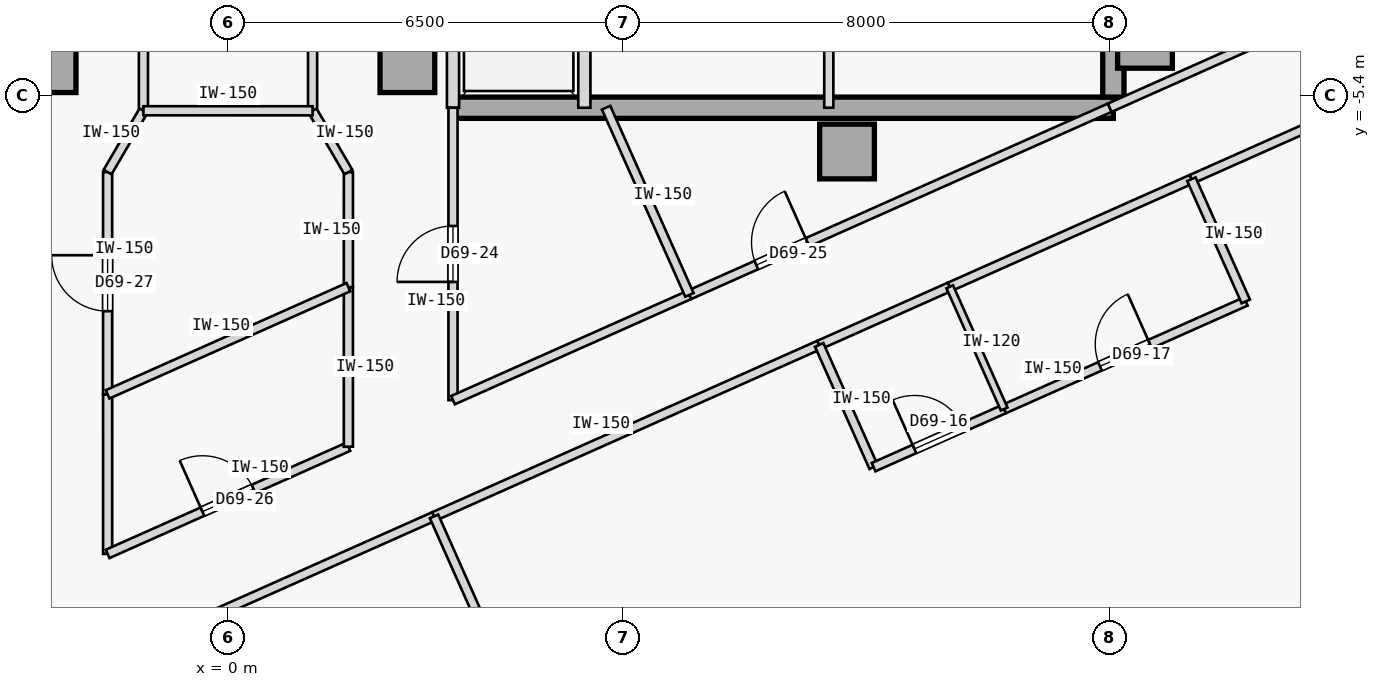
"""IFC4 building model, lengths in metres.
Left out: names, types, materials, properties, quantities, classifications, styles, units other than length and angle.
Written with IfcOpenShell. Run it as: python <this file> out.ifc"""

import sys

from ifc_helpers import new_model, si_unit, direction, frame, frame_2d, origin, origin_2d, place, context, subcontext, project, spatial, rectangle, extrude, element, fill, save


model = new_model("IFC4")
c1 = context("Model", 3, precision=1e-05, world=origin(), true_north=direction((0.0, 1.0)))
c2 = subcontext(c1, "Body", "Model", "MODEL_VIEW")
j1 = project(units=[si_unit("LENGTHUNIT", "METRE"), si_unit("PLANEANGLEUNIT", "RADIAN")], contexts=[c1])
p1 = place(None, origin())
s1 = spatial("IfcSite", under=j1, at=p1, CompositionType="ELEMENT")
p2 = place(p1, origin())
s2 = spatial("IfcBuilding", under=s1, at=p2, CompositionType="ELEMENT")
p3 = place(p2, frame((0.0, 0.0, 258.85)))
s3 = spatial("IfcBuildingStorey", under=s2, at=p3, CompositionType="ELEMENT", Elevation=258.85)
for number, where, z_axis, x_axis in (
    (1, (-2.95, -4.9, 0.0), (0.0, 0.0, 1.0), (1.0, 0.0, 0.0)),
    (2, (15.08, -4.5, 0.0), (0.0, 0.0, 1.0), (1.0, 0.0, 0.0)),
    (3, (10.18, -6.32, 0.0), (0.0, 0.0, 1.0), (1.0, 0.0, 0.0)),
    (4, (2.95, -4.9, 0.0), (0.0, 0.0, 1.0), (1.0, 0.0, 0.0)),
):
    element("IfcColumn", number, at=place(p3, frame(where, z_axis=z_axis, x_axis=x_axis)), inside=s3, PredefinedType="COLUMN", context=c2, shape_type="SweptSolid", body=[
        extrude(rectangle(XDim=0.9, YDim=0.9, at=origin_2d()), origin(), (0.0, 0.0, 1.0), 3.35),
    ])
p4 = place(p3, frame((3.7, -5.6, 0.0), z_axis=(0.0, 0.0, 1.0), x_axis=(1.0, 0.0, 0.0)))
e5 = element("IfcWall", 5, at=p4, inside=s3, PredefinedType="SHEAR", context=c2, shape_type="SweptSolid", body=[
    extrude(rectangle(XDim=10.86, YDim=0.35, at=frame_2d((5.43, 0.0))), origin(), (0.0, 0.0, 1.0), 3.125),
])
p5 = place(p3, frame((14.56, -5.425, 0.0), z_axis=(0.0, 0.0, 1.0), x_axis=(0.0, 1.0, 0.0)))
e6 = element("IfcWall", 6, at=p5, inside=s3, PredefinedType="SHEAR", context=c2, shape_type="SweptSolid", body=[
    extrude(rectangle(XDim=10.85, YDim=0.35, at=frame_2d((5.425, 0.0))), origin(), (0.0, 0.0, 1.0), 3.125),
])
for number, where, z_axis, x_axis in (
    (7, (3.7, -5.6, 0.0), (0.0, 0.0, 1.0), (0.0, 1.0, 0.0)),
    (8, (5.86, -5.6, 0.0), (0.0, 0.0, 1.0), (0.0, 1.0, 0.0)),
):
    element("IfcWall", number, at=place(p3, frame(where, z_axis=z_axis, x_axis=x_axis)), inside=s3, PredefinedType="STANDARD", context=c2, shape_type="SweptSolid", body=[
        extrude(rectangle(XDim=2.65, YDim=0.2, at=frame_2d((1.325, 0.0))), origin(), (0.0, 0.0, 1.0), 3.125),
    ])
p6 = place(p3, frame((9.88, -5.6, 0.0), z_axis=(0.0, 0.0, 1.0), x_axis=(0.0, 1.0, 0.0)))
e9 = element("IfcWall", 9, at=p6, inside=s3, PredefinedType="PARTITIONING", context=c2, shape_type="SweptSolid", body=[
    extrude(rectangle(XDim=2.65, YDim=0.15, at=frame_2d((1.325, 0.0))), origin(), (0.0, 0.0, 1.0), 3.125),
])
p7 = place(p3, frame((-1.391, -5.65, 0.0), z_axis=(0.0, 0.0, 1.0), x_axis=(-2.1605738e-05, 0.999999999767, 0.0)))
e10 = element("IfcWall", 10, at=p7, inside=s3, PredefinedType="PARTITIONING", context=c2, shape_type="SweptSolid", body=[
    extrude(rectangle(XDim=11.3, YDim=0.15, at=frame_2d((5.65, 0.0))), origin(), (0.0, 0.0, 1.0), 3.125),
])
p8 = place(p3, frame((1.391, -5.65, 0.0), z_axis=(0.0, 0.0, 1.0), x_axis=(4.3206809e-05, 0.999999999067, 0.0)))
e11 = element("IfcWall", 11, at=p8, inside=s3, PredefinedType="PARTITIONING", context=c2, shape_type="SweptSolid", body=[
    extrude(rectangle(XDim=11.301, YDim=0.15, at=frame_2d((5.65, 0.0))), origin(), (0.0, 0.0, 1.0), 3.125),
])
p9 = place(p8, frame((5.176, 0.0, 0.0)))
e12 = element("IfcOpeningElement", 12, at=p9, cuts=e11, PredefinedType="OPENING", context=c2, shape_type="SweptSolid", body=[
    extrude(rectangle(XDim=0.95, YDim=2.15, at=frame_2d((0.475, 1.075))), frame((0.0, 0.085, 0.0), z_axis=(0.0, -1.0, 0.0), x_axis=(1.0, 0.0, 0.0)), (0.0, 0.0, 1.0), 0.17),
])
p10 = place(p3, frame((-8.481, -17.605, 0.0), z_axis=(0.0, 0.0, 1.0), x_axis=(0.913546352883, 0.406734632328, 0.0)))
e13 = element("IfcWall", 13, at=p10, inside=s3, PredefinedType="PARTITIONING", context=c2, shape_type="SweptSolid", body=[
    extrude(rectangle(XDim=12.993, YDim=0.15, at=frame_2d((6.497, 0.0))), origin(), (0.0, 0.0, 1.0), 3.125),
])
p11 = place(p10, frame((6.021, 0.0, 0.0)))
e14 = element("IfcOpeningElement", 14, at=p11, cuts=e13, PredefinedType="OPENING", context=c2, shape_type="SweptSolid", body=[
    extrude(rectangle(XDim=0.95, YDim=2.15, at=frame_2d((0.475, 1.075))), frame((0.0, 0.085, 0.0), z_axis=(0.0, -1.0, 0.0), x_axis=(1.0, 0.0, 0.0)), (0.0, 0.0, 1.0), 0.17),
])
p12 = place(p3, frame((3.388, -12.321, 0.0), z_axis=(0.0, 0.0, 1.0), x_axis=(0.913552886643, 0.406719956857, 0.0)))
e15 = element("IfcWall", 15, at=p12, inside=s3, PredefinedType="PARTITIONING", context=c2, shape_type="SweptSolid", body=[
    extrude(rectangle(XDim=6.933, YDim=0.15, at=frame_2d((3.467, 0.0))), origin(), (0.0, 0.0, 1.0), 3.125),
])
p13 = place(p3, frame((15.843, -6.776, 0.0), z_axis=(0.0, 0.0, 1.0), x_axis=(0.913541183414, 0.406746243015, 0.0)))
e16 = element("IfcWall", 16, at=p13, inside=s3, PredefinedType="PARTITIONING", context=c2, shape_type="SweptSolid", body=[
    extrude(rectangle(XDim=17.999, YDim=0.15, at=frame_2d((9.0, 0.0))), origin(), (0.0, 0.0, 1.0), 3.125),
])
p14 = place(p13, frame((8.524, 0.0, 0.0)))
e17 = element("IfcOpeningElement", 17, at=p14, cuts=e16, PredefinedType="OPENING", context=c2, shape_type="SweptSolid", body=[
    extrude(rectangle(XDim=0.95, YDim=2.15, at=frame_2d((0.475, 1.075))), frame((0.0, 0.085, 0.0), z_axis=(0.0, -1.0, 0.0), x_axis=(1.0, 0.0, 0.0)), (0.0, 0.0, 1.0), 0.17),
])
p15 = place(p3, frame((9.722, -9.501, 0.0), z_axis=(0.0, 0.0, 1.0), x_axis=(0.913541436194, 0.406745675276, 0.0)))
e18 = element("IfcWall", 18, at=p15, inside=s3, PredefinedType="PARTITIONING", context=c2, shape_type="SweptSolid", body=[
    extrude(rectangle(XDim=2.35, YDim=0.15, at=frame_2d((1.175, 0.0))), origin(), (0.0, 0.0, 1.0), 3.125),
])
p16 = place(p3, frame((11.869, -8.545, 0.0), z_axis=(0.0, 0.0, 1.0), x_axis=(0.913554477336, 0.406716383908, 0.0)))
e19 = element("IfcWall", 19, at=p16, inside=s3, PredefinedType="PARTITIONING", context=c2, shape_type="SweptSolid", body=[
    extrude(rectangle(XDim=4.35, YDim=0.15, at=frame_2d((2.175, 0.0))), origin(), (0.0, 0.0, 1.0), 3.125),
])
p17 = place(p3, frame((3.7, -10.409, 0.0), z_axis=(0.0, 0.0, 1.0), x_axis=(5.0769153e-05, 0.999999998711, 0.0)))
e20 = element("IfcWall", 20, at=p17, inside=s3, PredefinedType="PARTITIONING", context=c2, shape_type="SweptSolid", body=[
    extrude(rectangle(XDim=4.809, YDim=0.15, at=frame_2d((2.404, 0.0))), origin(), (0.0, 0.0, 1.0), 3.125),
])
p18 = place(p17, frame((1.944, 0.0, 0.0)))
e21 = element("IfcOpeningElement", 21, at=p18, cuts=e20, PredefinedType="OPENING", context=c2, shape_type="SweptSolid", body=[
    extrude(rectangle(XDim=0.92, YDim=2.15, at=frame_2d((0.46, 1.075))), frame((0.0, 0.085, 0.0), z_axis=(0.0, -1.0, 0.0), x_axis=(1.0, 0.0, 0.0)), (0.0, 0.0, 1.0), 0.17),
])
p19 = place(p3, frame((3.7, -10.409, 0.0), z_axis=(0.0, 0.0, 1.0), x_axis=(0.91353932002, 0.406750428122, 0.0)))
e22 = element("IfcWall", 22, at=p19, inside=s3, PredefinedType="PARTITIONING", context=c2, shape_type="SweptSolid", body=[
    extrude(rectangle(XDim=4.256, YDim=0.15, at=frame_2d((2.128, 0.0))), origin(), (0.0, 0.0, 1.0), 3.125),
])
p20 = place(p3, frame((7.588, -8.677, 0.0), z_axis=(0.0, 0.0, 1.0), x_axis=(0.913555880467, 0.406713232221, 0.0)))
e23 = element("IfcWall", 23, at=p20, inside=s3, PredefinedType="PARTITIONING", context=c2, shape_type="SweptSolid", body=[
    extrude(rectangle(XDim=7.566, YDim=0.15, at=frame_2d((3.783, 0.0))), origin(), (0.0, 0.0, 1.0), 3.125),
])
p21 = place(p20, frame((1.205, 0.0, 0.0)))
e24 = element("IfcOpeningElement", 24, at=p21, cuts=e23, PredefinedType="OPENING", context=c2, shape_type="SweptSolid", body=[
    extrude(rectangle(XDim=0.92, YDim=2.15, at=frame_2d((0.46, 1.075))), frame((0.0, 0.085, 0.0), z_axis=(0.0, -1.0, 0.0), x_axis=(1.0, 0.0, 0.0)), (0.0, 0.0, 1.0), 0.17),
])
p22 = place(p3, frame((-1.98, -12.938, 0.0), z_axis=(0.0, 0.0, 1.0), x_axis=(-9.3049223e-05, 0.999999995671, 0.0)))
e25 = element("IfcWall", 25, at=p22, inside=s3, PredefinedType="PARTITIONING", context=c2, shape_type="SweptSolid", body=[
    extrude(rectangle(XDim=2.624, YDim=0.15, at=frame_2d((1.312, 0.0))), origin(), (0.0, 0.0, 1.0), 3.125),
])
p23 = place(p3, frame((-1.98, -12.938, 0.0), z_axis=(0.0, 0.0, 1.0), x_axis=(0.913530252303, 0.406770793111, 0.0)))
e26 = element("IfcWall", 26, at=p23, inside=s3, PredefinedType="PARTITIONING", context=c2, shape_type="SweptSolid", body=[
    extrude(rectangle(XDim=4.334, YDim=0.15, at=frame_2d((2.167, 0.0))), origin(), (0.0, 0.0, 1.0), 3.125),
])
p24 = place(p23, frame((1.707, 0.0, 0.0)))
e27 = element("IfcOpeningElement", 27, at=p24, cuts=e26, PredefinedType="OPENING", context=c2, shape_type="SweptSolid", body=[
    extrude(rectangle(XDim=0.92, YDim=2.15, at=frame_2d((0.46, 1.075))), frame((0.0, 0.085, 0.0), z_axis=(0.0, -1.0, 0.0), x_axis=(1.0, 0.0, 0.0)), (0.0, 0.0, 1.0), 0.17),
])
p25 = place(p3, frame((1.979, -11.175, 0.0), z_axis=(0.0, 0.0, 1.0), x_axis=(0.0, 1.0, 0.0)))
e28 = element("IfcWall", 28, at=p25, inside=s3, PredefinedType="PARTITIONING", context=c2, shape_type="SweptSolid", body=[
    extrude(rectangle(XDim=2.624, YDim=0.15, at=frame_2d((1.312, 0.0))), origin(), (0.0, 0.0, 1.0), 3.125),
])
p26 = place(p3, frame((-1.98, -10.314, 0.0), z_axis=(0.0, 0.0, 1.0), x_axis=(0.0, 1.0, 0.0)))
e29 = element("IfcWall", 29, at=p26, inside=s3, PredefinedType="PARTITIONING", context=c2, shape_type="SweptSolid", body=[
    extrude(rectangle(XDim=3.656, YDim=0.15, at=frame_2d((1.828, 0.0))), origin(), (0.0, 0.0, 1.0), 3.125),
])
p27 = place(p26, frame((1.368, 0.0, 0.0)))
e30 = element("IfcOpeningElement", 30, at=p27, cuts=e29, PredefinedType="OPENING", context=c2, shape_type="SweptSolid", body=[
    extrude(rectangle(XDim=0.92, YDim=2.15, at=frame_2d((0.46, 1.075))), frame((0.0, 0.085, 0.0), z_axis=(0.0, -1.0, 0.0), x_axis=(1.0, 0.0, 0.0)), (0.0, 0.0, 1.0), 0.17),
])
p28 = place(p3, frame((-1.98, -6.658, 0.0), z_axis=(0.0, 0.0, 1.0), x_axis=(0.504651025514, 0.863323428645, 0.0)))
e31 = element("IfcWall", 31, at=p28, inside=s3, PredefinedType="PARTITIONING", context=c2, shape_type="SweptSolid", body=[
    extrude(rectangle(XDim=1.167, YDim=0.15, at=frame_2d((0.584, 0.0))), origin(), (0.0, 0.0, 1.0), 3.125),
])
p29 = place(p3, frame((1.979, -8.551, 0.0), z_axis=(0.0, 0.0, 1.0), x_axis=(0.00025809781, 0.999999966693, 0.0)))
e32 = element("IfcWall", 32, at=p29, inside=s3, PredefinedType="PARTITIONING", context=c2, shape_type="SweptSolid", body=[
    extrude(rectangle(XDim=1.892, YDim=0.15, at=frame_2d((0.946, 0.0))), origin(), (0.0, 0.0, 1.0), 3.125),
])
p30 = place(p3, frame((1.391, -5.65, 0.0), z_axis=(0.0, 0.0, 1.0), x_axis=(0.504339173621, -0.863505644424, 0.0)))
e33 = element("IfcWall", 33, at=p30, inside=s3, PredefinedType="PARTITIONING", context=c2, shape_type="SweptSolid", body=[
    extrude(rectangle(XDim=1.167, YDim=0.15, at=frame_2d((0.583, 0.0))), origin(), (0.0, 0.0, 1.0), 3.125),
])
p31 = place(p3, frame((14.5, -5.6, 0.0), z_axis=(0.0, 0.0, 1.0), x_axis=(0.913550607208, 0.406725076766, 0.0)))
e34 = element("IfcWall", 34, at=p31, inside=s3, PredefinedType="PARTITIONING", context=c2, shape_type="SweptSolid", body=[
    extrude(rectangle(XDim=4.556, YDim=0.15, at=frame_2d((2.278, 0.0))), origin(), (0.0, 0.0, 1.0), 3.125),
])
p32 = place(p31, frame((2.501, 0.0, 0.0)))
e35 = element("IfcOpeningElement", 35, at=p32, cuts=e34, PredefinedType="OPENING", context=c2, shape_type="SweptSolid", body=[
    extrude(rectangle(XDim=0.92, YDim=2.15, at=frame_2d((0.46, 1.075))), frame((0.0, 0.085, 0.0), z_axis=(0.0, -1.0, 0.0), x_axis=(1.0, 0.0, 0.0)), (0.0, 0.0, 1.0), 0.17),
])
p33 = place(p3, frame((-1.391, -5.65, 0.0), z_axis=(0.0, 0.0, 1.0), x_axis=(0.999999984594, -0.000175530979, 0.0)))
e36 = element("IfcWall", 36, at=p33, inside=s3, PredefinedType="PARTITIONING", context=c2, shape_type="SweptSolid", body=[
    extrude(rectangle(XDim=2.782, YDim=0.15, at=frame_2d((1.391, 0.0))), origin(), (0.0, 0.0, 1.0), 3.125),
])
p34 = place(p3, frame((7.267, -21.031, 0.0), z_axis=(0.0, 0.0, 1.0), x_axis=(-0.406751296215, 0.913538933504, 0.0)))
e37 = element("IfcWall", 37, at=p34, inside=s3, PredefinedType="PARTITIONING", context=c2, shape_type="SweptSolid", body=[
    extrude(rectangle(XDim=9.535, YDim=0.15, at=frame_2d((4.768, 0.0))), origin(), (0.0, 0.0, 1.0), 3.125),
])
p35 = place(p3, frame((10.617, -11.51, 0.0), z_axis=(0.0, 0.0, 1.0), x_axis=(-0.406725294076, 0.913550510459, 0.0)))
e38 = element("IfcWall", 38, at=p35, inside=s3, PredefinedType="PARTITIONING", context=c2, shape_type="SweptSolid", body=[
    extrude(rectangle(XDim=2.2, YDim=0.15, at=frame_2d((1.1, 0.0))), origin(), (0.0, 0.0, 1.0), 3.125),
])
p36 = place(p3, frame((10.617, -11.51, 0.0), z_axis=(0.0, 0.0, 1.0), x_axis=(0.913558622212, 0.406707073682, 0.0)))
e39 = element("IfcWall", 39, at=p36, inside=s3, PredefinedType="PARTITIONING", context=c2, shape_type="SweptSolid", body=[
    extrude(rectangle(XDim=2.35, YDim=0.15, at=frame_2d((1.175, 0.0))), origin(), (0.0, 0.0, 1.0), 3.125),
])
p37 = place(p36, frame((0.735, 0.0, 0.0)))
e40 = element("IfcOpeningElement", 40, at=p37, cuts=e39, PredefinedType="OPENING", context=c2, shape_type="SweptSolid", body=[
    extrude(rectangle(XDim=0.88, YDim=2.15, at=frame_2d((0.44, 1.075))), frame((0.0, 0.085, 0.0), z_axis=(0.0, -1.0, 0.0), x_axis=(1.0, 0.0, 0.0)), (0.0, 0.0, 1.0), 0.17),
])
p38 = place(p3, frame((12.764, -10.555, 0.0), z_axis=(0.0, 0.0, 1.0), x_axis=(0.913545193015, 0.406737237438, 0.0)))
e41 = element("IfcWall", 41, at=p38, inside=s3, PredefinedType="PARTITIONING", context=c2, shape_type="SweptSolid", body=[
    extrude(rectangle(XDim=4.35, YDim=0.15, at=frame_2d((2.175, 0.0))), origin(), (0.0, 0.0, 1.0), 3.125),
])
p39 = place(p38, frame((1.725, 0.0, 0.0)))
e42 = element("IfcOpeningElement", 42, at=p39, cuts=e41, PredefinedType="OPENING", context=c2, shape_type="SweptSolid", body=[
    extrude(rectangle(XDim=0.9, YDim=2.15, at=frame_2d((0.45, 1.075))), frame((0.0, 0.085, 0.0), z_axis=(0.0, -1.0, 0.0), x_axis=(1.0, 0.0, 0.0)), (0.0, 0.0, 1.0), 0.17),
])
p40 = place(p3, frame((16.738, -8.785, 0.0), z_axis=(0.0, 0.0, 1.0), x_axis=(-0.406725294076, 0.913550510459, 0.0)))
e43 = element("IfcWall", 43, at=p40, inside=s3, PredefinedType="PARTITIONING", context=c2, shape_type="SweptSolid", body=[
    extrude(rectangle(XDim=2.2, YDim=0.15, at=frame_2d((1.1, 0.0))), origin(), (0.0, 0.0, 1.0), 3.125),
])
p41 = place(p3, frame((12.764, -10.555, 0.0), z_axis=(0.0, 0.0, 1.0), x_axis=(-0.406817905151, 0.913509273105, 0.0)))
e44 = element("IfcWall", 44, at=p41, inside=s3, PredefinedType="PARTITIONING", context=c2, shape_type="SweptSolid", body=[
    extrude(rectangle(XDim=2.2, YDim=0.12, at=frame_2d((1.1, 0.0))), origin(), (0.0, 0.0, 1.0), 3.125),
])
p42 = place(p3, frame((7.588, -8.677, 0.0), z_axis=(0.0, 0.0, 1.0), x_axis=(-0.406763688861, 0.913533415603, 0.0)))
e45 = element("IfcWall", 45, at=p42, inside=s3, PredefinedType="PARTITIONING", context=c2, shape_type="SweptSolid", body=[
    extrude(rectangle(XDim=3.369, YDim=0.15, at=frame_2d((1.685, 0.0))), origin(), (0.0, 0.0, 1.0), 3.125),
])
p43 = place(p3, frame((-1.98, -10.314, 0.0), z_axis=(0.0, 0.0, 1.0), x_axis=(0.913539572356, 0.406749861388, 0.0)))
e46 = element("IfcWall", 46, at=p43, inside=s3, PredefinedType="PARTITIONING", context=c2, shape_type="SweptSolid", body=[
    extrude(rectangle(XDim=4.334, YDim=0.15, at=frame_2d((2.167, 0.0))), origin(), (0.0, 0.0, 1.0), 3.125),
])
p44 = place(p37, origin())
e47 = element("IfcDoor", 47, at=p44, inside=s3, OperationType="SINGLE_SWING_LEFT", PredefinedType="DOOR", context=c2, shape_type="SweptSolid", body=[
    extrude(rectangle(XDim=0.88, YDim=2.15, at=frame_2d((0.44, 1.075))), frame((0.0, 0.025, 0.0), z_axis=(0.0, -1.0, 0.0), x_axis=(1.0, 0.0, 0.0)), (0.0, 0.0, 1.0), 0.05),
])
fill(e40, e47)
p45 = place(p39, origin())
e48 = element("IfcDoor", 48, at=p45, inside=s3, OperationType="SINGLE_SWING_RIGHT", PredefinedType="DOOR", context=c2, shape_type="SweptSolid", body=[
    extrude(rectangle(XDim=0.9, YDim=2.15, at=frame_2d((0.45, 1.075))), frame((0.0, 0.025, 0.0), z_axis=(0.0, -1.0, 0.0), x_axis=(1.0, 0.0, 0.0)), (0.0, 0.0, 1.0), 0.05),
])
fill(e42, e48)
p46 = place(p18, origin())
e49 = element("IfcDoor", 49, at=p46, inside=s3, OperationType="SINGLE_SWING_LEFT", PredefinedType="DOOR", context=c2, shape_type="SweptSolid", body=[
    extrude(rectangle(XDim=0.92, YDim=2.15, at=frame_2d((0.46, 1.075))), frame((0.0, 0.025, 0.0), z_axis=(0.0, -1.0, 0.0), x_axis=(1.0, 0.0, 0.0)), (0.0, 0.0, 1.0), 0.05),
])
fill(e21, e49)
p47 = place(p21, origin())
e50 = element("IfcDoor", 50, at=p47, inside=s3, OperationType="SINGLE_SWING_RIGHT", PredefinedType="DOOR", context=c2, shape_type="SweptSolid", body=[
    extrude(rectangle(XDim=0.92, YDim=2.15, at=frame_2d((0.46, 1.075))), frame((0.0, 0.025, 0.0), z_axis=(0.0, -1.0, 0.0), x_axis=(1.0, 0.0, 0.0)), (0.0, 0.0, 1.0), 0.05),
])
fill(e24, e50)
p48 = place(p24, origin())
e51 = element("IfcDoor", 51, at=p48, inside=s3, OperationType="SINGLE_SWING_LEFT", PredefinedType="DOOR", context=c2, shape_type="SweptSolid", body=[
    extrude(rectangle(XDim=0.92, YDim=2.15, at=frame_2d((0.46, 1.075))), frame((0.0, 0.025, 0.0), z_axis=(0.0, -1.0, 0.0), x_axis=(1.0, 0.0, 0.0)), (0.0, 0.0, 1.0), 0.05),
])
fill(e27, e51)
p49 = place(p27, origin())
e52 = element("IfcDoor", 52, at=p49, inside=s3, OperationType="SINGLE_SWING_RIGHT", PredefinedType="DOOR", context=c2, shape_type="SweptSolid", body=[
    extrude(rectangle(XDim=0.92, YDim=2.15, at=frame_2d((0.46, 1.075))), frame((0.0, 0.025, 0.0), z_axis=(0.0, -1.0, 0.0), x_axis=(1.0, 0.0, 0.0)), (0.0, 0.0, 1.0), 0.05),
])
fill(e30, e52)
save(model, sys.argv[1])
